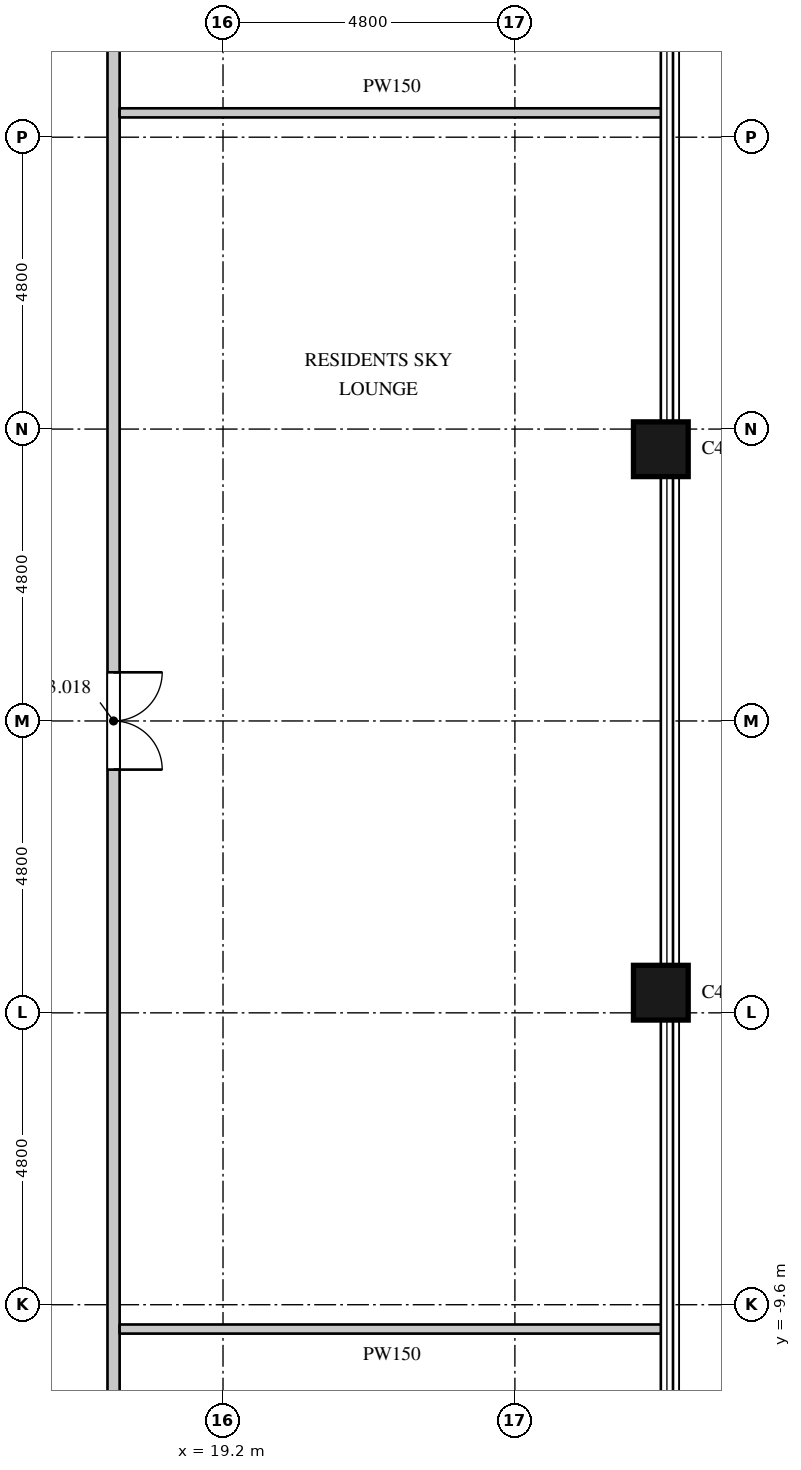
"""IFC4 building model, lengths in metres.
Left out: names, types, materials, properties, quantities, classifications, styles, units other than length and angle.
Written with IfcOpenShell. Run it as: python <this file> out.ifc"""

import sys

from ifc_helpers import new_model, si_unit, direction, frame, frame_2d, origin, origin_2d, place, context, subcontext, project, spatial, rectangle, extrude, element, fill, save


model = new_model("IFC4")
c1 = context("Model", 3, precision=1e-05, world=origin(), true_north=direction((0.0, 1.0)))
c2 = subcontext(c1, "Body", "Model", "MODEL_VIEW")
j1 = project(units=[si_unit("LENGTHUNIT", "METRE"), si_unit("PLANEANGLEUNIT", "RADIAN")], contexts=[c1])
p1 = place(None, origin())
s1 = spatial("IfcSite", under=j1, at=p1, CompositionType="ELEMENT")
p2 = place(p1, origin())
s2 = spatial("IfcBuilding", under=s1, at=p2, CompositionType="ELEMENT")
p3 = place(p2, frame((0.0, 0.0, 314.7)))
s3 = spatial("IfcBuildingStorey", under=s2, at=p3, CompositionType="ELEMENT", Elevation=314.7)
for number, where, z_axis, x_axis in (
    (1, (26.4, -4.469, 0.0), (0.0, 0.0, 1.0), (0.0, 1.0, 0.0)),
    (2, (26.4, 4.469, 0.0), (0.0, 0.0, 1.0), (0.0, 1.0, 0.0)),
):
    element("IfcColumn", number, at=place(p3, frame(where, z_axis=z_axis, x_axis=x_axis)), inside=s3, PredefinedType="COLUMN", context=c2, shape_type="SweptSolid", body=[
        extrude(rectangle(XDim=0.9, YDim=0.9, at=origin_2d()), origin(), (0.0, 0.0, 1.0), 5.4),
    ])
p4 = place(p3, frame((17.4, -15.0, 0.0), z_axis=(0.0, 0.0, 1.0), x_axis=(0.0, 1.0, 0.0)))
e3 = element("IfcWall", 3, at=p4, inside=s3, PredefinedType="PARTITIONING", context=c2, shape_type="SweptSolid", body=[
    extrude(rectangle(XDim=30.0, YDim=0.2, at=frame_2d((15.0, 0.0))), origin(), (0.0, 0.0, 1.0), 5.1),
])
p5 = place(p4, frame((14.2, 0.0, 0.0)))
e4 = element("IfcOpeningElement", 4, at=p5, cuts=e3, PredefinedType="OPENING", context=c2, shape_type="SweptSolid", body=[
    extrude(rectangle(XDim=1.6, YDim=2.4, at=frame_2d((0.8, 1.2))), frame((0.0, 0.11, 0.0), z_axis=(0.0, -1.0, 0.0), x_axis=(1.0, 0.0, 0.0)), (0.0, 0.0, 1.0), 0.22),
])
p6 = place(p4, frame((26.65, 0.0, 0.0)))
e5 = element("IfcOpeningElement", 5, at=p6, cuts=e3, PredefinedType="OPENING", context=c2, shape_type="SweptSolid", body=[
    extrude(rectangle(XDim=1.6, YDim=2.4, at=frame_2d((0.8, 1.2))), frame((0.0, 0.11, 0.0), z_axis=(0.0, -1.0, 0.0), x_axis=(1.0, 0.0, 0.0)), (0.0, 0.0, 1.0), 0.22),
])
p7 = place(p4, frame((1.75, 0.0, 0.0)))
e6 = element("IfcOpeningElement", 6, at=p7, cuts=e3, PredefinedType="OPENING", context=c2, shape_type="SweptSolid", body=[
    extrude(rectangle(XDim=1.6, YDim=2.4, at=frame_2d((0.8, 1.2))), frame((0.0, 0.11, 0.0), z_axis=(0.0, -1.0, 0.0), x_axis=(1.0, 0.0, 0.0)), (0.0, 0.0, 1.0), 0.22),
])
for number, where, z_axis, x_axis in (
    (7, (17.5, -10.0, 0.0), (0.0, 0.0, 1.0), (1.0, 0.0, 0.0)),
    (8, (17.5, 10.0, 0.0), (0.0, 0.0, 1.0), (1.0, 0.0, 0.0)),
):
    element("IfcWall", number, at=place(p3, frame(where, z_axis=z_axis, x_axis=x_axis)), inside=s3, PredefinedType="PARTITIONING", context=c2, shape_type="SweptSolid", body=[
        extrude(rectangle(XDim=8.955, YDim=0.15, at=frame_2d((4.478, 0.0))), origin(), (0.0, 0.0, 1.0), 5.1),
    ])
p8 = place(p5, origin())
e9 = element("IfcDoor", 9, at=p8, inside=s3, OperationType="DOUBLE_DOOR_SINGLE_SWING", PredefinedType="DOOR", context=c2, shape_type="SweptSolid", body=[
    extrude(rectangle(XDim=1.6, YDim=2.4, at=frame_2d((0.8, 1.2))), frame((0.0, 0.025, 0.0), z_axis=(0.0, -1.0, 0.0), x_axis=(1.0, 0.0, 0.0)), (0.0, 0.0, 1.0), 0.05),
])
fill(e4, e9)
save(model, sys.argv[1])
